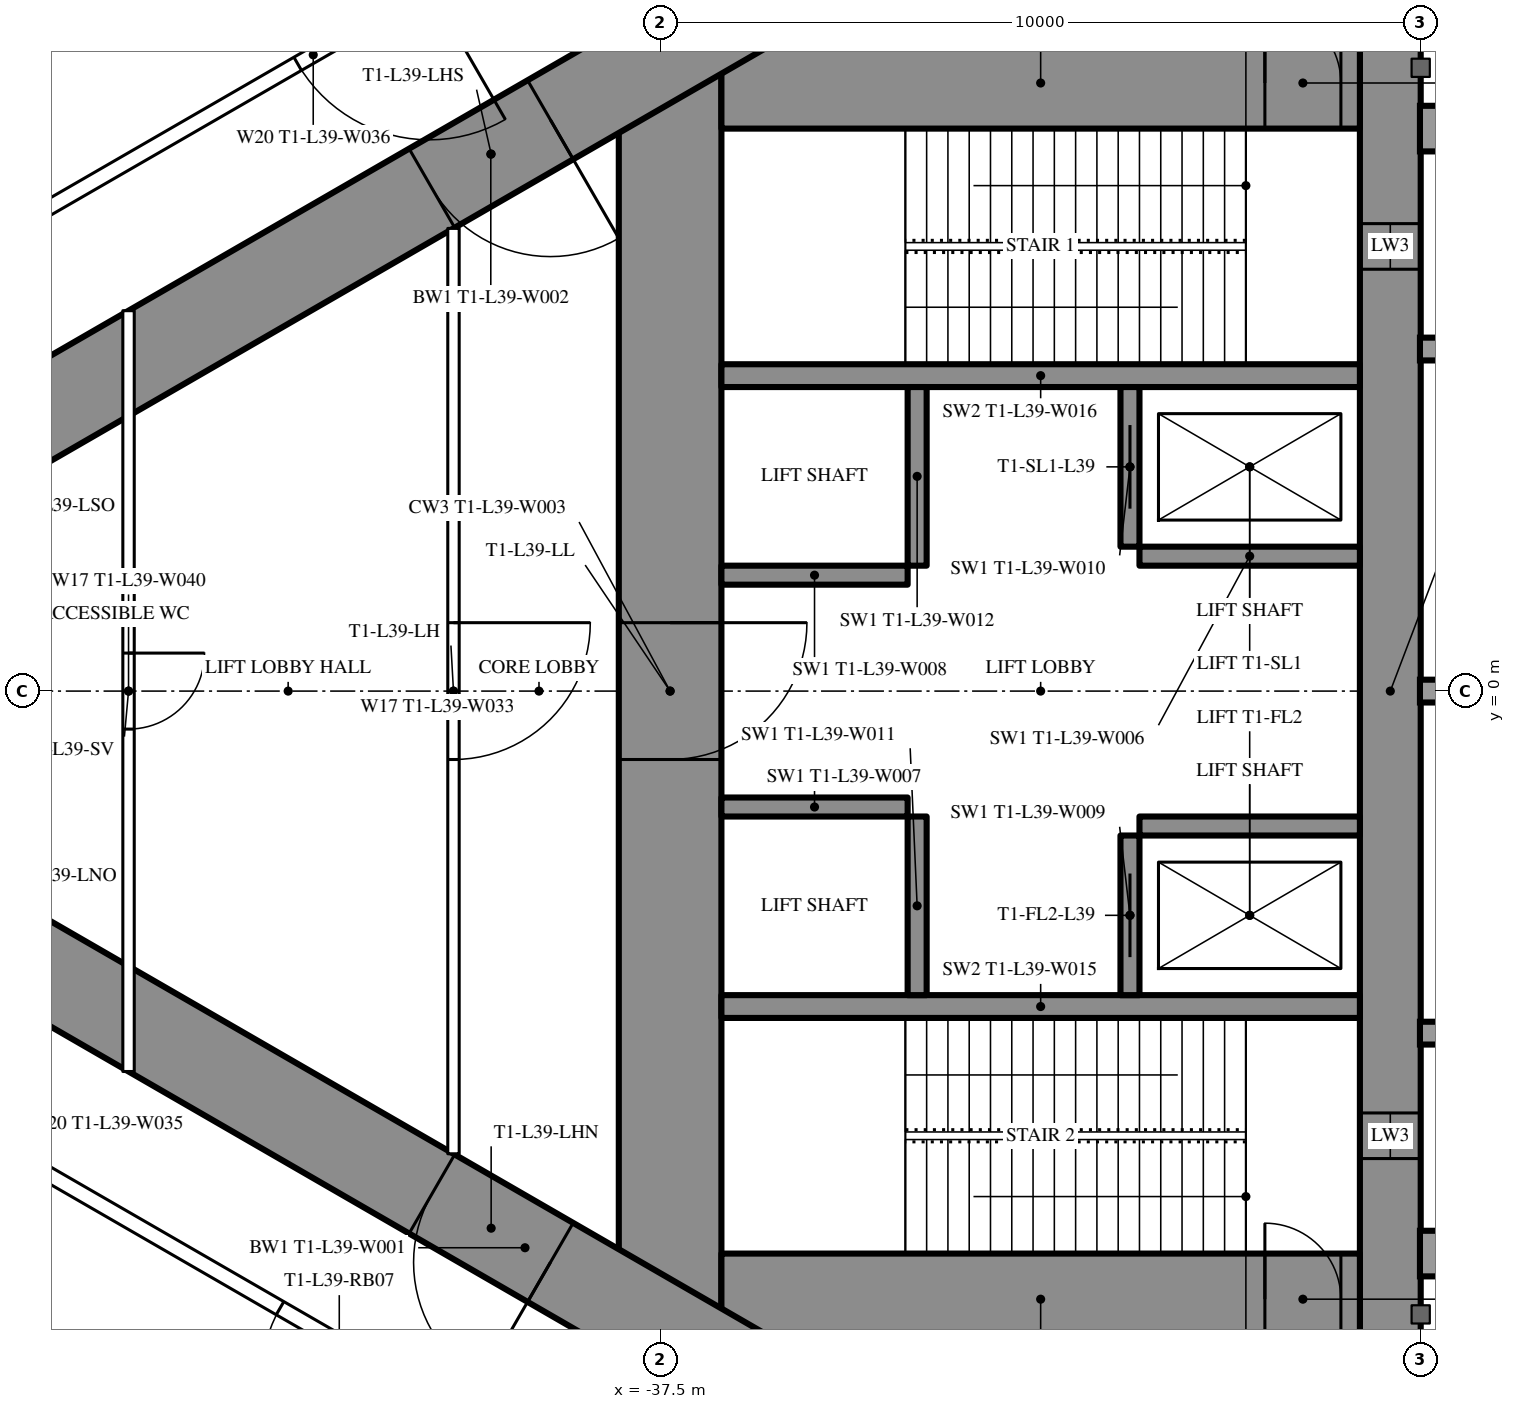
"""IFC4 building model, lengths in metres.
Left out: names, types, materials, properties, quantities, classifications, styles, units other than length and angle.
Written with IfcOpenShell. Run it as: python <this file> out.ifc"""

import sys

from ifc_helpers import new_model, si_unit, direction, frame, frame_2d, origin, place, context, subcontext, project, spatial, rectangle, extrude, element, fill, save


model = new_model("IFC4")
c1 = context("Model", 3, precision=1e-05, world=origin(), true_north=direction((0.0, 1.0)))
c2 = subcontext(c1, "Body", "Model", "MODEL_VIEW")
j1 = project(units=[si_unit("LENGTHUNIT", "METRE"), si_unit("PLANEANGLEUNIT", "RADIAN")], contexts=[c1])
p1 = place(None, origin())
s1 = spatial("IfcSite", under=j1, at=p1, CompositionType="ELEMENT")
p2 = place(p1, origin())
s2 = spatial("IfcBuilding", under=s1, at=p2, CompositionType="ELEMENT")
p3 = place(p2, frame((0.0, 0.0, 146.7)))
s3 = spatial("IfcBuildingStorey", under=s2, at=p3, CompositionType="ELEMENT", Elevation=146.7)
p4 = place(p3, frame((-27.9, 8.6, 0.0), z_axis=(0.0, 0.0, 1.0), x_axis=(0.0, -1.0, 0.0)))
e1 = element("IfcWall", 1, at=p4, inside=s3, PredefinedType="SHEAR", context=c2, shape_type="SweptSolid", body=[
    extrude(rectangle(XDim=17.2, YDim=0.8, at=frame_2d((8.6, 0.0))), origin(), (0.0, 0.0, 1.0), 6.0),
])
p5 = place(p4, frame((2.45, 0.0, 0.6)))
e2 = element("IfcOpeningElement", 2, at=p5, cuts=e1, PredefinedType="OPENING", context=c2, shape_type="SweptSolid", body=[
    extrude(rectangle(XDim=0.6, YDim=4.5, at=frame_2d((0.3, 2.25))), frame((0.0, 0.41, 0.0), z_axis=(0.0, -1.0, 0.0), x_axis=(1.0, 0.0, 0.0)), (0.0, 0.0, 1.0), 0.82),
])
p6 = place(p4, frame((14.15, 0.0, 0.6)))
e3 = element("IfcOpeningElement", 3, at=p6, cuts=e1, PredefinedType="OPENING", context=c2, shape_type="SweptSolid", body=[
    extrude(rectangle(XDim=0.6, YDim=4.5, at=frame_2d((0.3, 2.25))), frame((0.0, 0.41, 0.0), z_axis=(0.0, -1.0, 0.0), x_axis=(1.0, 0.0, 0.0)), (0.0, 0.0, 1.0), 0.82),
])
p7 = place(p3, frame((-37.375, 8.6, 0.0), z_axis=(0.0, 0.0, 1.0), x_axis=(0.0, -1.0, 0.0)))
e4 = element("IfcWall", 4, at=p7, inside=s3, PredefinedType="SHEAR", context=c2, shape_type="SweptSolid", body=[
    extrude(rectangle(XDim=17.2, YDim=1.35, at=frame_2d((8.6, 0.0))), origin(), (0.0, 0.0, 1.0), 6.0),
])
p8 = place(p7, frame((7.7, 0.0, 0.0)))
e5 = element("IfcOpeningElement", 5, at=p8, cuts=e4, PredefinedType="OPENING", context=c2, shape_type="SweptSolid", body=[
    extrude(rectangle(XDim=1.8, YDim=2.2, at=frame_2d((0.9, 1.1))), frame((0.0, 0.685, 0.0), z_axis=(0.0, -1.0, 0.0), x_axis=(1.0, 0.0, 0.0)), (0.0, 0.0, 1.0), 1.37),
])
p9 = place(p3, frame((-28.3, 8.0, 0.0), z_axis=(0.0, 0.0, 1.0), x_axis=(-1.0, 0.0, 0.0)))
e6 = element("IfcWall", 6, at=p9, inside=s3, PredefinedType="SHEAR", context=c2, shape_type="SweptSolid", body=[
    extrude(rectangle(XDim=8.4, YDim=1.2, at=frame_2d((4.2, 0.0))), origin(), (0.0, 0.0, 1.0), 6.0),
])
p10 = place(p9, frame((0.25, 0.0, 0.0)))
e7 = element("IfcOpeningElement", 7, at=p10, cuts=e6, PredefinedType="OPENING", context=c2, shape_type="SweptSolid", body=[
    extrude(rectangle(XDim=1.0, YDim=2.2, at=frame_2d((0.5, 1.1))), frame((0.0, 0.61, 0.0), z_axis=(0.0, -1.0, 0.0), x_axis=(1.0, 0.0, 0.0)), (0.0, 0.0, 1.0), 1.22),
])
p11 = place(p3, frame((-28.3, -8.0, 0.0), z_axis=(0.0, 0.0, 1.0), x_axis=(-1.0, 0.0, 0.0)))
e8 = element("IfcWall", 8, at=p11, inside=s3, PredefinedType="SHEAR", context=c2, shape_type="SweptSolid", body=[
    extrude(rectangle(XDim=8.4, YDim=1.2, at=frame_2d((4.2, 0.0))), origin(), (0.0, 0.0, 1.0), 6.0),
])
p12 = place(p11, frame((0.25, 0.0, 0.0)))
e9 = element("IfcOpeningElement", 9, at=p12, cuts=e8, PredefinedType="OPENING", context=c2, shape_type="SweptSolid", body=[
    extrude(rectangle(XDim=1.0, YDim=2.2, at=frame_2d((0.5, 1.1))), frame((0.0, 0.61, 0.0), z_axis=(0.0, -1.0, 0.0), x_axis=(1.0, 0.0, 0.0)), (0.0, 0.0, 1.0), 1.22),
])
for number, where, z_axis, x_axis in (
    (10, (-28.3, 4.15, 0.0), (0.0, 0.0, 1.0), (-1.0, 0.0, 0.0)),
    (11, (-28.3, -4.15, 0.0), (0.0, 0.0, 1.0), (-1.0, 0.0, 0.0)),
):
    element("IfcWall", number, at=place(p3, frame(where, z_axis=z_axis, x_axis=x_axis)), inside=s3, PredefinedType="SHEAR", context=c2, shape_type="SweptSolid", body=[
        extrude(rectangle(XDim=8.4, YDim=0.3, at=frame_2d((4.2, 0.0))), origin(), (0.0, 0.0, 1.0), 6.0),
    ])
p13 = place(p3, frame((-31.325, 4.0, 0.0), z_axis=(0.0, 0.0, 1.0), x_axis=(0.0, -1.0, 0.0)))
e12 = element("IfcWall", 12, at=p13, inside=s3, PredefinedType="SHEAR", context=c2, shape_type="SweptSolid", body=[
    extrude(rectangle(XDim=2.1, YDim=0.25, at=frame_2d((1.05, 0.0))), origin(), (0.0, 0.0, 1.0), 6.0),
])
p14 = place(p13, frame((0.5, 0.0, 0.0)))
e13 = element("IfcOpeningElement", 13, at=p14, cuts=e12, PredefinedType="OPENING", context=c2, shape_type="SweptSolid", body=[
    extrude(rectangle(XDim=1.1, YDim=2.2, at=frame_2d((0.55, 1.1))), frame((0.0, 0.135, 0.0), z_axis=(0.0, -1.0, 0.0), x_axis=(1.0, 0.0, 0.0)), (0.0, 0.0, 1.0), 0.27),
])
p15 = place(p3, frame((-34.125, 4.0, 0.0), z_axis=(0.0, 0.0, 1.0), x_axis=(0.0, -1.0, 0.0)))
e14 = element("IfcWall", 14, at=p15, inside=s3, PredefinedType="SHEAR", context=c2, shape_type="SweptSolid", body=[
    extrude(rectangle(XDim=2.35, YDim=0.25, at=frame_2d((1.175, 0.0))), origin(), (0.0, 0.0, 1.0), 6.0),
])
p16 = place(p3, frame((-28.3, 1.775, 0.0), z_axis=(0.0, 0.0, 1.0), x_axis=(-1.0, 0.0, 0.0)))
e15 = element("IfcWall", 15, at=p16, inside=s3, PredefinedType="SHEAR", context=c2, shape_type="SweptSolid", body=[
    extrude(rectangle(XDim=2.9, YDim=0.25, at=frame_2d((1.45, 0.0))), origin(), (0.0, 0.0, 1.0), 6.0),
])
p17 = place(p3, frame((-34.25, 1.525, 0.0), z_axis=(0.0, 0.0, 1.0), x_axis=(-1.0, 0.0, 0.0)))
e16 = element("IfcWall", 16, at=p17, inside=s3, PredefinedType="SHEAR", context=c2, shape_type="SweptSolid", body=[
    extrude(rectangle(XDim=2.45, YDim=0.25, at=frame_2d((1.225, 0.0))), origin(), (0.0, 0.0, 1.0), 6.0),
])
p18 = place(p3, frame((-31.325, -1.9, 0.0), z_axis=(0.0, 0.0, 1.0), x_axis=(0.0, -1.0, 0.0)))
e17 = element("IfcWall", 17, at=p18, inside=s3, PredefinedType="SHEAR", context=c2, shape_type="SweptSolid", body=[
    extrude(rectangle(XDim=2.1, YDim=0.25, at=frame_2d((1.05, 0.0))), origin(), (0.0, 0.0, 1.0), 6.0),
])
p19 = place(p18, frame((0.5, 0.0, 0.0)))
e18 = element("IfcOpeningElement", 18, at=p19, cuts=e17, PredefinedType="OPENING", context=c2, shape_type="SweptSolid", body=[
    extrude(rectangle(XDim=1.1, YDim=2.2, at=frame_2d((0.55, 1.1))), frame((0.0, 0.135, 0.0), z_axis=(0.0, -1.0, 0.0), x_axis=(1.0, 0.0, 0.0)), (0.0, 0.0, 1.0), 0.27),
])
p20 = place(p3, frame((-34.125, -1.65, 0.0), z_axis=(0.0, 0.0, 1.0), x_axis=(0.0, -1.0, 0.0)))
e19 = element("IfcWall", 19, at=p20, inside=s3, PredefinedType="SHEAR", context=c2, shape_type="SweptSolid", body=[
    extrude(rectangle(XDim=2.35, YDim=0.25, at=frame_2d((1.175, 0.0))), origin(), (0.0, 0.0, 1.0), 6.0),
])
p21 = place(p3, frame((-28.3, -1.775, 0.0), z_axis=(0.0, 0.0, 1.0), x_axis=(-1.0, 0.0, 0.0)))
e20 = element("IfcWall", 20, at=p21, inside=s3, PredefinedType="SHEAR", context=c2, shape_type="SweptSolid", body=[
    extrude(rectangle(XDim=2.9, YDim=0.25, at=frame_2d((1.45, 0.0))), origin(), (0.0, 0.0, 1.0), 6.0),
])
p22 = place(p3, frame((-34.25, -1.525, 0.0), z_axis=(0.0, 0.0, 1.0), x_axis=(-1.0, 0.0, 0.0)))
e21 = element("IfcWall", 21, at=p22, inside=s3, PredefinedType="SHEAR", context=c2, shape_type="SweptSolid", body=[
    extrude(rectangle(XDim=2.45, YDim=0.25, at=frame_2d((1.225, 0.0))), origin(), (0.0, 0.0, 1.0), 6.0),
])
p23 = place(p3, frame((-27.2, 14.3, 0.0), z_axis=(0.0, 0.0, 1.0), x_axis=(-0.866026593062, -0.499997940104, 0.0)))
e22 = element("IfcWall", 22, at=p23, inside=s3, PredefinedType="SHEAR", context=c2, shape_type="SweptSolid", body=[
    extrude(rectangle(XDim=28.946, YDim=1.2, at=frame_2d((14.473, 0.0))), origin(), (0.0, 0.0, 1.0), 6.0),
])
p24 = place(p23, frame((4.6, 0.0, 0.0)))
e23 = element("IfcOpeningElement", 23, at=p24, cuts=e22, PredefinedType="OPENING", context=c2, shape_type="SweptSolid", body=[
    extrude(rectangle(XDim=1.0, YDim=2.2, at=frame_2d((0.5, 1.1))), frame((0.0, 0.61, 0.0), z_axis=(0.0, -1.0, 0.0), x_axis=(1.0, 0.0, 0.0)), (0.0, 0.0, 1.0), 1.22),
])
p25 = place(p23, frame((13.568, 0.0, 0.0)))
e24 = element("IfcOpeningElement", 24, at=p25, cuts=e22, PredefinedType="OPENING", context=c2, shape_type="SweptSolid", body=[
    extrude(rectangle(XDim=1.8, YDim=2.2, at=frame_2d((0.9, 1.1))), frame((0.0, 0.61, 0.0), z_axis=(0.0, -1.0, 0.0), x_axis=(1.0, 0.0, 0.0)), (0.0, 0.0, 1.0), 1.22),
])
p26 = place(p3, frame((-27.2, -14.3, 0.0), z_axis=(0.0, 0.0, 1.0), x_axis=(-0.866024021859, 0.500002393557, 0.0)))
e25 = element("IfcWall", 25, at=p26, inside=s3, PredefinedType="SHEAR", context=c2, shape_type="SweptSolid", body=[
    extrude(rectangle(XDim=27.907, YDim=1.2, at=frame_2d((13.954, 0.0))), origin(), (0.0, 0.0, 1.0), 6.0),
])
p27 = place(p26, frame((4.6, 0.0, 0.0)))
e26 = element("IfcOpeningElement", 26, at=p27, cuts=e25, PredefinedType="OPENING", context=c2, shape_type="SweptSolid", body=[
    extrude(rectangle(XDim=1.0, YDim=2.2, at=frame_2d((0.5, 1.1))), frame((0.0, 0.61, 0.0), z_axis=(0.0, -1.0, 0.0), x_axis=(1.0, 0.0, 0.0)), (0.0, 0.0, 1.0), 1.22),
])
p28 = place(p26, frame((13.568, 0.0, 0.0)))
e27 = element("IfcOpeningElement", 27, at=p28, cuts=e25, PredefinedType="OPENING", context=c2, shape_type="SweptSolid", body=[
    extrude(rectangle(XDim=1.8, YDim=2.2, at=frame_2d((0.9, 1.1))), frame((0.0, 0.61, 0.0), z_axis=(0.0, -1.0, 0.0), x_axis=(1.0, 0.0, 0.0)), (0.0, 0.0, 1.0), 1.22),
])
p29 = place(p3, frame((-27.572, 16.741, 0.0), z_axis=(0.0, 0.0, 1.0), x_axis=(-0.866026395587, -0.499998282143, 0.0)))
e28 = element("IfcWall", 28, at=p29, inside=s3, PredefinedType="PARTITIONING", context=c2, shape_type="SweptSolid", body=[
    extrude(rectangle(XDim=33.482, YDim=0.2, at=frame_2d((16.741, 0.0))), origin(), (0.0, 0.0, 1.0), 5.75),
])
p30 = place(p29, frame((4.354, 0.0, 0.0)))
e29 = element("IfcOpeningElement", 29, at=p30, cuts=e28, PredefinedType="OPENING", context=c2, shape_type="SweptSolid", body=[
    extrude(rectangle(XDim=1.8, YDim=2.2, at=frame_2d((0.9, 1.1))), frame((0.0, 0.11, 0.0), z_axis=(0.0, -1.0, 0.0), x_axis=(1.0, 0.0, 0.0)), (0.0, 0.0, 1.0), 0.22),
])
p31 = place(p29, frame((14.977, 0.0, 0.0)))
e30 = element("IfcOpeningElement", 30, at=p31, cuts=e28, PredefinedType="OPENING", context=c2, shape_type="SweptSolid", body=[
    extrude(rectangle(XDim=2.0, YDim=2.4, at=frame_2d((1.0, 1.2))), frame((0.0, 0.11, 0.0), z_axis=(0.0, -1.0, 0.0), x_axis=(1.0, 0.0, 0.0)), (0.0, 0.0, 1.0), 0.22),
])
p32 = place(p29, frame((26.788, 0.0, 0.0)))
e31 = element("IfcOpeningElement", 31, at=p32, cuts=e28, PredefinedType="OPENING", context=c2, shape_type="SweptSolid", body=[
    extrude(rectangle(XDim=1.8, YDim=2.2, at=frame_2d((0.9, 1.1))), frame((0.0, 0.11, 0.0), z_axis=(0.0, -1.0, 0.0), x_axis=(1.0, 0.0, 0.0)), (0.0, 0.0, 1.0), 0.22),
])
p33 = place(p3, frame((-36.92, -11.344, 0.0), z_axis=(0.0, 0.0, 1.0), x_axis=(-0.866028313256, 0.499994960614, 0.0)))
e32 = element("IfcWall", 32, at=p33, inside=s3, PredefinedType="PARTITIONING", context=c2, shape_type="SweptSolid", body=[
    extrude(rectangle(XDim=22.568, YDim=0.2, at=frame_2d((11.284, 0.0))), origin(), (0.0, 0.0, 1.0), 5.75),
])
p34 = place(p33, frame((15.994, 0.0, 0.0)))
e33 = element("IfcOpeningElement", 33, at=p34, cuts=e32, PredefinedType="OPENING", context=c2, shape_type="SweptSolid", body=[
    extrude(rectangle(XDim=1.8, YDim=2.2, at=frame_2d((0.9, 1.1))), frame((0.0, 0.11, 0.0), z_axis=(0.0, -1.0, 0.0), x_axis=(1.0, 0.0, 0.0)), (0.0, 0.0, 1.0), 0.22),
])
p35 = place(p33, frame((4.651, 0.0, 0.0)))
e34 = element("IfcOpeningElement", 34, at=p35, cuts=e32, PredefinedType="OPENING", context=c2, shape_type="SweptSolid", body=[
    extrude(rectangle(XDim=1.8, YDim=2.2, at=frame_2d((0.9, 1.1))), frame((0.0, 0.11, 0.0), z_axis=(0.0, -1.0, 0.0), x_axis=(1.0, 0.0, 0.0)), (0.0, 0.0, 1.0), 0.22),
])
p36 = place(p3, frame((-40.225, 6.087, 0.0), z_axis=(0.0, 0.0, 1.0), x_axis=(0.0, -1.0, 0.0)))
e35 = element("IfcWall", 35, at=p36, inside=s3, PredefinedType="PARTITIONING", context=c2, shape_type="SweptSolid", body=[
    extrude(rectangle(XDim=12.174, YDim=0.15, at=frame_2d((6.087, 0.0))), origin(), (0.0, 0.0, 1.0), 5.75),
])
p37 = place(p36, frame((5.187, 0.0, 0.0)))
e36 = element("IfcOpeningElement", 36, at=p37, cuts=e35, PredefinedType="OPENING", context=c2, shape_type="SweptSolid", body=[
    extrude(rectangle(XDim=1.8, YDim=2.2, at=frame_2d((0.9, 1.1))), frame((0.0, 0.085, 0.0), z_axis=(0.0, -1.0, 0.0), x_axis=(1.0, 0.0, 0.0)), (0.0, 0.0, 1.0), 0.17),
])
p38 = place(p3, frame((-44.5, 5.005, 0.0), z_axis=(0.0, 0.0, 1.0), x_axis=(0.0, -1.0, 0.0)))
e37 = element("IfcWall", 37, at=p38, inside=s3, PredefinedType="PARTITIONING", context=c2, shape_type="SweptSolid", body=[
    extrude(rectangle(XDim=10.009, YDim=0.15, at=frame_2d((5.005, 0.0))), origin(), (0.0, 0.0, 1.0), 5.75),
])
p39 = place(p38, frame((4.505, 0.0, 0.0)))
e38 = element("IfcOpeningElement", 38, at=p39, cuts=e37, PredefinedType="OPENING", context=c2, shape_type="SweptSolid", body=[
    extrude(rectangle(XDim=1.0, YDim=2.2, at=frame_2d((0.5, 1.1))), frame((0.0, 0.085, 0.0), z_axis=(0.0, -1.0, 0.0), x_axis=(1.0, 0.0, 0.0)), (0.0, 0.0, 1.0), 0.17),
])
p40 = place(p31, origin())
e39 = element("IfcDoor", 39, at=p40, inside=s3, OperationType="DOUBLE_DOOR_SINGLE_SWING", PredefinedType="DOOR", context=c2, shape_type="SweptSolid", body=[
    extrude(rectangle(XDim=2.0, YDim=2.4, at=frame_2d((1.0, 1.2))), frame((0.0, 0.025, 0.0), z_axis=(0.0, -1.0, 0.0), x_axis=(1.0, 0.0, 0.0)), (0.0, 0.0, 1.0), 0.05),
])
fill(e30, e39)
p41 = place(p35, origin())
e40 = element("IfcDoor", 40, at=p41, inside=s3, OperationType="DOUBLE_DOOR_SINGLE_SWING", PredefinedType="DOOR", context=c2, shape_type="SweptSolid", body=[
    extrude(rectangle(XDim=1.8, YDim=2.2, at=frame_2d((0.9, 1.1))), frame((0.0, 0.025, 0.0), z_axis=(0.0, -1.0, 0.0), x_axis=(1.0, 0.0, 0.0)), (0.0, 0.0, 1.0), 0.05),
])
fill(e34, e40)
p42 = place(p37, origin())
e41 = element("IfcDoor", 41, at=p42, inside=s3, OperationType="DOUBLE_DOOR_SINGLE_SWING", PredefinedType="DOOR", context=c2, shape_type="SweptSolid", body=[
    extrude(rectangle(XDim=1.8, YDim=2.2, at=frame_2d((0.9, 1.1))), frame((0.0, 0.025, 0.0), z_axis=(0.0, -1.0, 0.0), x_axis=(1.0, 0.0, 0.0)), (0.0, 0.0, 1.0), 0.05),
])
fill(e36, e41)
p43 = place(p39, origin())
e42 = element("IfcDoor", 42, at=p43, inside=s3, OperationType="SINGLE_SWING_LEFT", PredefinedType="DOOR", context=c2, shape_type="SweptSolid", body=[
    extrude(rectangle(XDim=1.0, YDim=2.2, at=frame_2d((0.5, 1.1))), frame((0.0, 0.025, 0.0), z_axis=(0.0, -1.0, 0.0), x_axis=(1.0, 0.0, 0.0)), (0.0, 0.0, 1.0), 0.05),
])
fill(e38, e42)
p44 = place(p25, origin())
e43 = element("IfcDoor", 43, at=p44, inside=s3, OperationType="DOUBLE_DOOR_SINGLE_SWING", PredefinedType="DOOR", context=c2, shape_type="SweptSolid", body=[
    extrude(rectangle(XDim=1.8, YDim=2.2, at=frame_2d((0.9, 1.1))), frame((0.0, 0.025, 0.0), z_axis=(0.0, -1.0, 0.0), x_axis=(1.0, 0.0, 0.0)), (0.0, 0.0, 1.0), 0.05),
])
fill(e24, e43)
p45 = place(p28, origin())
e44 = element("IfcDoor", 44, at=p45, inside=s3, OperationType="DOUBLE_DOOR_SINGLE_SWING", PredefinedType="DOOR", context=c2, shape_type="SweptSolid", body=[
    extrude(rectangle(XDim=1.8, YDim=2.2, at=frame_2d((0.9, 1.1))), frame((0.0, 0.025, 0.0), z_axis=(0.0, -1.0, 0.0), x_axis=(1.0, 0.0, 0.0)), (0.0, 0.0, 1.0), 0.05),
])
fill(e27, e44)
p46 = place(p8, origin())
e45 = element("IfcDoor", 45, at=p46, inside=s3, OperationType="DOUBLE_DOOR_SINGLE_SWING", PredefinedType="DOOR", context=c2, shape_type="SweptSolid", body=[
    extrude(rectangle(XDim=1.8, YDim=2.2, at=frame_2d((0.9, 1.1))), frame((0.0, 0.025, 0.0), z_axis=(0.0, -1.0, 0.0), x_axis=(1.0, 0.0, 0.0)), (0.0, 0.0, 1.0), 0.05),
])
fill(e5, e45)
p47 = place(p10, origin())
e46 = element("IfcDoor", 46, at=p47, inside=s3, OperationType="SINGLE_SWING_RIGHT", PredefinedType="DOOR", context=c2, shape_type="SweptSolid", body=[
    extrude(rectangle(XDim=1.0, YDim=2.2, at=frame_2d((0.5, 1.1))), frame((0.0, 0.025, 0.0), z_axis=(0.0, -1.0, 0.0), x_axis=(1.0, 0.0, 0.0)), (0.0, 0.0, 1.0), 0.05),
])
fill(e7, e46)
p48 = place(p12, origin())
e47 = element("IfcDoor", 47, at=p48, inside=s3, OperationType="SINGLE_SWING_RIGHT", PredefinedType="DOOR", context=c2, shape_type="SweptSolid", body=[
    extrude(rectangle(XDim=1.0, YDim=2.2, at=frame_2d((0.5, 1.1))), frame((0.0, 0.025, 0.0), z_axis=(0.0, -1.0, 0.0), x_axis=(1.0, 0.0, 0.0)), (0.0, 0.0, 1.0), 0.05),
])
fill(e9, e47)
p49 = place(p14, origin())
e48 = element("IfcDoor", 48, at=p49, inside=s3, OperationType="SLIDING_TO_LEFT", PredefinedType="USERDEFINED", context=c2, shape_type="SweptSolid", body=[
    extrude(rectangle(XDim=1.1, YDim=2.2, at=frame_2d((0.55, 1.1))), frame((0.0, 0.025, 0.0), z_axis=(0.0, -1.0, 0.0), x_axis=(1.0, 0.0, 0.0)), (0.0, 0.0, 1.0), 0.05),
])
fill(e13, e48)
p50 = place(p19, origin())
e49 = element("IfcDoor", 49, at=p50, inside=s3, OperationType="SLIDING_TO_LEFT", PredefinedType="USERDEFINED", context=c2, shape_type="SweptSolid", body=[
    extrude(rectangle(XDim=1.1, YDim=2.2, at=frame_2d((0.55, 1.1))), frame((0.0, 0.025, 0.0), z_axis=(0.0, -1.0, 0.0), x_axis=(1.0, 0.0, 0.0)), (0.0, 0.0, 1.0), 0.05),
])
fill(e18, e49)
p51 = place(p5, origin())
e50 = element("IfcWindow", 50, at=p51, inside=s3, PartitioningType="SINGLE_PANEL", PredefinedType="WINDOW", context=c2, shape_type="SweptSolid", body=[
    extrude(rectangle(XDim=0.6, YDim=4.5, at=frame_2d((0.3, 2.25))), frame((0.0, 0.03, 0.0), z_axis=(0.0, -1.0, 0.0), x_axis=(1.0, 0.0, 0.0)), (0.0, 0.0, 1.0), 0.06),
])
fill(e2, e50)
p52 = place(p6, origin())
e51 = element("IfcWindow", 51, at=p52, inside=s3, PartitioningType="SINGLE_PANEL", PredefinedType="WINDOW", context=c2, shape_type="SweptSolid", body=[
    extrude(rectangle(XDim=0.6, YDim=4.5, at=frame_2d((0.3, 2.25))), frame((0.0, 0.03, 0.0), z_axis=(0.0, -1.0, 0.0), x_axis=(1.0, 0.0, 0.0)), (0.0, 0.0, 1.0), 0.06),
])
fill(e3, e51)
save(model, sys.argv[1])
